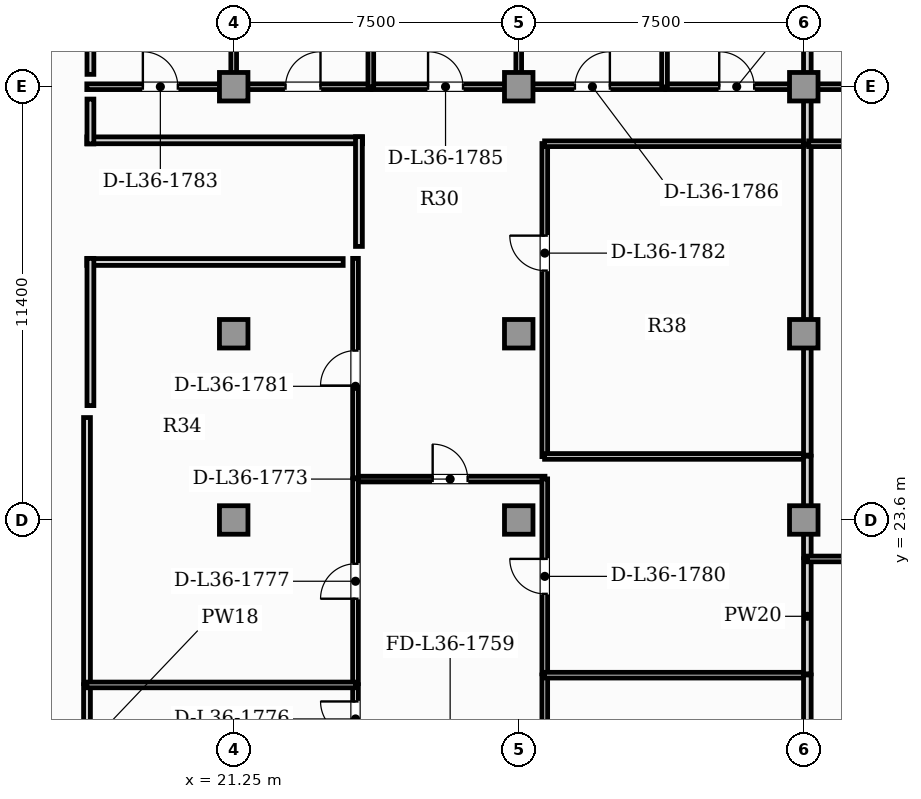
"""IFC4 building model, lengths in metres.
Left out: names, types, materials, properties, quantities, classifications, styles, units other than length and angle.
Written with IfcOpenShell. Run it as: python <this file> out.ifc"""

import sys

from ifc_helpers import new_model, si_unit, direction, frame, frame_2d, origin, origin_2d, place, context, subcontext, project, spatial, rectangle, extrude, element, fill, save


model = new_model("IFC4")
c1 = context("Model", 3, precision=1e-05, world=origin(), true_north=direction((0.0, 1.0)))
c2 = subcontext(c1, "Body", "Model", "MODEL_VIEW")
j1 = project(units=[si_unit("LENGTHUNIT", "METRE"), si_unit("PLANEANGLEUNIT", "RADIAN")], contexts=[c1])
p1 = place(None, origin())
s1 = spatial("IfcSite", under=j1, at=p1, CompositionType="ELEMENT")
p2 = place(p1, origin())
s2 = spatial("IfcBuilding", under=s1, at=p2, CompositionType="ELEMENT")
p3 = place(p2, frame((0.0, 0.0, 149.05)))
s3 = spatial("IfcBuildingStorey", under=s2, at=p3, CompositionType="ELEMENT", Elevation=149.05)
for number, where, z_axis, x_axis in (
    (1, (21.25, 23.6, 0.0), (0.0, 0.0, 1.0), (1.0, 0.0, 0.0)),
    (2, (28.75, 23.6, 0.0), (0.0, 0.0, 1.0), (1.0, 0.0, 0.0)),
    (3, (36.25, 23.6, 0.0), (0.0, 0.0, 1.0), (1.0, 0.0, 0.0)),
    (4, (21.25, 28.5, 0.0), (0.0, 0.0, 1.0), (1.0, 0.0, 0.0)),
    (5, (28.75, 28.5, 0.0), (0.0, 0.0, 1.0), (1.0, 0.0, 0.0)),
    (6, (36.25, 28.5, 0.0), (0.0, 0.0, 1.0), (1.0, 0.0, 0.0)),
    (7, (21.25, 35.0, 0.0), (0.0, 0.0, 1.0), (1.0, 0.0, 0.0)),
    (8, (28.75, 35.0, 0.0), (0.0, 0.0, 1.0), (1.0, 0.0, 0.0)),
    (9, (36.25, 35.0, 0.0), (0.0, 0.0, 1.0), (1.0, 0.0, 0.0)),
):
    element("IfcColumn", number, at=place(p3, frame(where, z_axis=z_axis, x_axis=x_axis)), inside=s3, PredefinedType="COLUMN", context=c2, shape_type="SweptSolid", body=[
        extrude(rectangle(XDim=0.75, YDim=0.75, at=origin_2d()), origin(), (0.0, 0.0, 1.0), 3.85),
    ])
p4 = place(p3, frame((17.39, 17.465, 0.0), z_axis=(0.0, 0.0, 1.0), x_axis=(0.0, 1.0, 0.0)))
e10 = element("IfcWall", 10, at=p4, inside=s3, PredefinedType="PARTITIONING", context=c2, shape_type="SweptSolid", body=[
    extrude(rectangle(XDim=1.8, YDim=0.18, at=frame_2d((0.9, 0.0))), origin(), (0.0, 0.0, 1.0), 3.63),
])
p5 = place(p3, frame((17.39, 19.295, 0.0), z_axis=(0.0, 0.0, 1.0), x_axis=(0.0, 1.0, 0.0)))
e11 = element("IfcWall", 11, at=p5, inside=s3, PredefinedType="PARTITIONING", context=c2, shape_type="SweptSolid", body=[
    extrude(rectangle(XDim=7.0, YDim=0.18, at=frame_2d((3.5, 0.0))), origin(), (0.0, 0.0, 1.0), 3.63),
])
p6 = place(p3, frame((24.45, 24.676, 0.0), z_axis=(0.0, 0.0, 1.0), x_axis=(1.0, 0.0, 0.0)))
e12 = element("IfcWall", 12, at=p6, inside=s3, PredefinedType="PARTITIONING", context=c2, shape_type="SweptSolid", body=[
    extrude(rectangle(XDim=4.99, YDim=0.15, at=frame_2d((2.495, 0.0))), origin(), (0.0, 0.0, 1.0), 3.63),
])
p7 = place(p6, frame((2.035, 0.0, 0.0)))
e13 = element("IfcOpeningElement", 13, at=p7, cuts=e12, PredefinedType="OPENING", context=c2, shape_type="SweptSolid", body=[
    extrude(rectangle(XDim=0.92, YDim=2.1, at=frame_2d((0.46, 1.05))), frame((0.0, 0.085, 0.0), z_axis=(0.0, -1.0, 0.0), x_axis=(1.0, 0.0, 0.0)), (0.0, 0.0, 1.0), 0.17),
])
p8 = place(p3, frame((24.455, 17.465, 0.0), z_axis=(0.0, 0.0, 1.0), x_axis=(0.0, 1.0, 0.0)))
e14 = element("IfcWall", 14, at=p8, inside=s3, PredefinedType="PARTITIONING", context=c2, shape_type="SweptSolid", body=[
    extrude(rectangle(XDim=1.8, YDim=0.15, at=frame_2d((0.9, 0.0))), origin(), (0.0, 0.0, 1.0), 3.63),
])
p9 = place(p8, frame((0.44, 0.0, 0.0)))
e15 = element("IfcOpeningElement", 15, at=p9, cuts=e14, PredefinedType="OPENING", context=c2, shape_type="SweptSolid", body=[
    extrude(rectangle(XDim=0.92, YDim=2.1, at=frame_2d((0.46, 1.05))), frame((0.0, 0.085, 0.0), z_axis=(0.0, -1.0, 0.0), x_axis=(1.0, 0.0, 0.0)), (0.0, 0.0, 1.0), 0.17),
])
p10 = place(p3, frame((24.455, 19.295, 0.0), z_axis=(0.0, 0.0, 1.0), x_axis=(0.0, 1.0, 0.0)))
e16 = element("IfcWall", 16, at=p10, inside=s3, PredefinedType="PARTITIONING", context=c2, shape_type="SweptSolid", body=[
    extrude(rectangle(XDim=5.386, YDim=0.15, at=frame_2d((2.693, 0.0))), origin(), (0.0, 0.0, 1.0), 3.63),
])
p11 = place(p10, frame((2.233, 0.0, 0.0)))
e17 = element("IfcOpeningElement", 17, at=p11, cuts=e16, PredefinedType="OPENING", context=c2, shape_type="SweptSolid", body=[
    extrude(rectangle(XDim=0.92, YDim=2.1, at=frame_2d((0.46, 1.05))), frame((0.0, 0.085, 0.0), z_axis=(0.0, -1.0, 0.0), x_axis=(1.0, 0.0, 0.0)), (0.0, 0.0, 1.0), 0.17),
])
p12 = place(p3, frame((29.435, 15.635, 0.0), z_axis=(0.0, 0.0, 1.0), x_axis=(0.0, 1.0, 0.0)))
e18 = element("IfcWall", 18, at=p12, inside=s3, PredefinedType="PARTITIONING", context=c2, shape_type="SweptSolid", body=[
    extrude(rectangle(XDim=3.886, YDim=0.15, at=frame_2d((1.943, 0.0))), origin(), (0.0, 0.0, 1.0), 3.63),
])
p13 = place(p12, frame((1.483, 0.0, 0.0)))
e19 = element("IfcOpeningElement", 19, at=p13, cuts=e18, PredefinedType="OPENING", context=c2, shape_type="SweptSolid", body=[
    extrude(rectangle(XDim=0.92, YDim=2.1, at=frame_2d((0.46, 1.05))), frame((0.0, 0.085, 0.0), z_axis=(0.0, -1.0, 0.0), x_axis=(1.0, 0.0, 0.0)), (0.0, 0.0, 1.0), 0.17),
])
p14 = place(p3, frame((29.435, 19.552, 0.0), z_axis=(0.0, 0.0, 1.0), x_axis=(0.0, 1.0, 0.0)))
e20 = element("IfcWall", 20, at=p14, inside=s3, PredefinedType="PARTITIONING", context=c2, shape_type="SweptSolid", body=[
    extrude(rectangle(XDim=5.13, YDim=0.15, at=frame_2d((2.565, 0.0))), origin(), (0.0, 0.0, 1.0), 3.63),
])
p15 = place(p14, frame((2.105, 0.0, 0.0)))
e21 = element("IfcOpeningElement", 21, at=p15, cuts=e20, PredefinedType="OPENING", context=c2, shape_type="SweptSolid", body=[
    extrude(rectangle(XDim=0.92, YDim=2.1, at=frame_2d((0.46, 1.05))), frame((0.0, 0.085, 0.0), z_axis=(0.0, -1.0, 0.0), x_axis=(1.0, 0.0, 0.0)), (0.0, 0.0, 1.0), 0.17),
])
p16 = place(p3, frame((24.455, 24.711, 0.0), z_axis=(0.0, 0.0, 1.0), x_axis=(0.0, 1.0, 0.0)))
e22 = element("IfcWall", 22, at=p16, inside=s3, PredefinedType="PARTITIONING", context=c2, shape_type="SweptSolid", body=[
    extrude(rectangle(XDim=5.772, YDim=0.15, at=frame_2d((2.886, 0.0))), origin(), (0.0, 0.0, 1.0), 3.63),
])
p17 = place(p16, frame((2.426, 0.0, 0.0)))
e23 = element("IfcOpeningElement", 23, at=p17, cuts=e22, PredefinedType="OPENING", context=c2, shape_type="SweptSolid", body=[
    extrude(rectangle(XDim=0.92, YDim=2.1, at=frame_2d((0.46, 1.05))), frame((0.0, 0.085, 0.0), z_axis=(0.0, -1.0, 0.0), x_axis=(1.0, 0.0, 0.0)), (0.0, 0.0, 1.0), 0.17),
])
p18 = place(p3, frame((29.435, 25.267, 0.0), z_axis=(0.0, 0.0, 1.0), x_axis=(0.0, 1.0, 0.0)))
e24 = element("IfcWall", 24, at=p18, inside=s3, PredefinedType="PARTITIONING", context=c2, shape_type="SweptSolid", body=[
    extrude(rectangle(XDim=8.238, YDim=0.15, at=frame_2d((4.119, 0.0))), origin(), (0.0, 0.0, 1.0), 3.63),
])
p19 = place(p18, frame((4.895, 0.0, 0.0)))
e25 = element("IfcOpeningElement", 25, at=p19, cuts=e24, PredefinedType="OPENING", context=c2, shape_type="SweptSolid", body=[
    extrude(rectangle(XDim=0.92, YDim=2.1, at=frame_2d((0.46, 1.05))), frame((0.0, 0.085, 0.0), z_axis=(0.0, -1.0, 0.0), x_axis=(1.0, 0.0, 0.0)), (0.0, 0.0, 1.0), 0.17),
])
p20 = place(p3, frame((29.43, 33.5, 0.0), z_axis=(0.0, 0.0, 1.0), x_axis=(1.0, 0.0, 0.0)))
e26 = element("IfcWall", 26, at=p20, inside=s3, PredefinedType="PARTITIONING", context=c2, shape_type="SweptSolid", body=[
    extrude(rectangle(XDim=6.919, YDim=0.15, at=frame_2d((3.459, 0.0))), origin(), (0.0, 0.0, 1.0), 3.63),
])
p21 = place(p3, frame((17.385, 35.0, 0.0), z_axis=(0.0, 0.0, 1.0), x_axis=(1.0, 0.0, 0.0)))
e27 = element("IfcWall", 27, at=p21, inside=s3, PredefinedType="PARTITIONING", context=c2, shape_type="SweptSolid", body=[
    extrude(rectangle(XDim=3.87, YDim=0.15, at=frame_2d((1.935, 0.0))), origin(), (0.0, 0.0, 1.0), 3.013),
])
p22 = place(p21, frame((1.475, 0.0, 0.0)))
e28 = element("IfcOpeningElement", 28, at=p22, cuts=e27, PredefinedType="OPENING", context=c2, shape_type="SweptSolid", body=[
    extrude(rectangle(XDim=0.92, YDim=2.1, at=frame_2d((0.46, 1.05))), frame((0.0, 0.085, 0.0), z_axis=(0.0, -1.0, 0.0), x_axis=(1.0, 0.0, 0.0)), (0.0, 0.0, 1.0), 0.17),
])
p23 = place(p3, frame((21.285, 35.0, 0.0), z_axis=(0.0, 0.0, 1.0), x_axis=(1.0, 0.0, 0.0)))
e29 = element("IfcWall", 29, at=p23, inside=s3, PredefinedType="PARTITIONING", context=c2, shape_type="SweptSolid", body=[
    extrude(rectangle(XDim=3.578, YDim=0.15, at=frame_2d((1.789, 0.0))), origin(), (0.0, 0.0, 1.0), 3.013),
])
p24 = place(p23, frame((1.329, 0.0, 0.0)))
e30 = element("IfcOpeningElement", 30, at=p24, cuts=e29, PredefinedType="OPENING", context=c2, shape_type="SweptSolid", body=[
    extrude(rectangle(XDim=0.92, YDim=2.1, at=frame_2d((0.46, 1.05))), frame((0.0, 0.085, 0.0), z_axis=(0.0, -1.0, 0.0), x_axis=(1.0, 0.0, 0.0)), (0.0, 0.0, 1.0), 0.17),
])
p25 = place(p3, frame((24.893, 35.0, 0.0), z_axis=(0.0, 0.0, 1.0), x_axis=(1.0, 0.0, 0.0)))
e31 = element("IfcWall", 31, at=p25, inside=s3, PredefinedType="PARTITIONING", context=c2, shape_type="SweptSolid", body=[
    extrude(rectangle(XDim=3.862, YDim=0.15, at=frame_2d((1.931, 0.0))), origin(), (0.0, 0.0, 1.0), 3.013),
])
p26 = place(p25, frame((1.471, 0.0, 0.0)))
e32 = element("IfcOpeningElement", 32, at=p26, cuts=e31, PredefinedType="OPENING", context=c2, shape_type="SweptSolid", body=[
    extrude(rectangle(XDim=0.92, YDim=2.1, at=frame_2d((0.46, 1.05))), frame((0.0, 0.085, 0.0), z_axis=(0.0, -1.0, 0.0), x_axis=(1.0, 0.0, 0.0)), (0.0, 0.0, 1.0), 0.17),
])
p27 = place(p3, frame((28.785, 35.0, 0.0), z_axis=(0.0, 0.0, 1.0), x_axis=(1.0, 0.0, 0.0)))
e33 = element("IfcWall", 33, at=p27, inside=s3, PredefinedType="PARTITIONING", context=c2, shape_type="SweptSolid", body=[
    extrude(rectangle(XDim=3.807, YDim=0.15, at=frame_2d((1.903, 0.0))), origin(), (0.0, 0.0, 1.0), 3.013),
])
p28 = place(p27, frame((1.443, 0.0, 0.0)))
e34 = element("IfcOpeningElement", 34, at=p28, cuts=e33, PredefinedType="OPENING", context=c2, shape_type="SweptSolid", body=[
    extrude(rectangle(XDim=0.92, YDim=2.1, at=frame_2d((0.46, 1.05))), frame((0.0, 0.085, 0.0), z_axis=(0.0, -1.0, 0.0), x_axis=(1.0, 0.0, 0.0)), (0.0, 0.0, 1.0), 0.17),
])
p29 = place(p3, frame((32.622, 35.0, 0.0), z_axis=(0.0, 0.0, 1.0), x_axis=(1.0, 0.0, 0.0)))
e35 = element("IfcWall", 35, at=p29, inside=s3, PredefinedType="PARTITIONING", context=c2, shape_type="SweptSolid", body=[
    extrude(rectangle(XDim=3.728, YDim=0.15, at=frame_2d((1.864, 0.0))), origin(), (0.0, 0.0, 1.0), 3.013),
])
p30 = place(p29, frame((1.404, 0.0, 0.0)))
e36 = element("IfcOpeningElement", 36, at=p30, cuts=e35, PredefinedType="OPENING", context=c2, shape_type="SweptSolid", body=[
    extrude(rectangle(XDim=0.92, YDim=2.1, at=frame_2d((0.46, 1.05))), frame((0.0, 0.085, 0.0), z_axis=(0.0, -1.0, 0.0), x_axis=(1.0, 0.0, 0.0)), (0.0, 0.0, 1.0), 0.17),
])
p31 = place(p3, frame((36.344, 33.495, 0.0), z_axis=(0.0, 0.0, 1.0), x_axis=(0.0, 1.0, 0.0)))
e37 = element("IfcWall", 37, at=p31, inside=s3, PredefinedType="PARTITIONING", context=c2, shape_type="SweptSolid", body=[
    extrude(rectangle(XDim=1.51, YDim=0.2, at=frame_2d((0.755, 0.0))), origin(), (0.0, 0.0, 1.0), 3.177),
])
p32 = place(p3, frame((17.385, 19.26, 0.0), z_axis=(0.0, 0.0, 1.0), x_axis=(1.0, 0.0, 0.0)))
e38 = element("IfcWall", 38, at=p32, inside=s3, PredefinedType="PARTITIONING", context=c2, shape_type="SweptSolid", body=[
    extrude(rectangle(XDim=7.075, YDim=0.15, at=frame_2d((3.538, 0.0))), origin(), (0.0, 0.0, 1.0), 3.63),
])
p33 = place(p3, frame((29.43, 19.517, 0.0), z_axis=(0.0, 0.0, 1.0), x_axis=(1.0, 0.0, 0.0)))
e39 = element("IfcWall", 39, at=p33, inside=s3, PredefinedType="PARTITIONING", context=c2, shape_type="SweptSolid", body=[
    extrude(rectangle(XDim=6.919, YDim=0.15, at=frame_2d((3.459, 0.0))), origin(), (0.0, 0.0, 1.0), 3.63),
])
p34 = place(p3, frame((36.344, 15.635, 0.0), z_axis=(0.0, 0.0, 1.0), x_axis=(0.0, 1.0, 0.0)))
e40 = element("IfcWall", 40, at=p34, inside=s3, PredefinedType="PARTITIONING", context=c2, shape_type="SweptSolid", body=[
    extrude(rectangle(XDim=3.886, YDim=0.2, at=frame_2d((1.943, 0.0))), origin(), (0.0, 0.0, 1.0), 3.177),
])
p35 = place(p3, frame((29.43, 25.272, 0.0), z_axis=(0.0, 0.0, 1.0), x_axis=(1.0, 0.0, 0.0)))
e41 = element("IfcWall", 41, at=p35, inside=s3, PredefinedType="PARTITIONING", context=c2, shape_type="SweptSolid", body=[
    extrude(rectangle(XDim=6.919, YDim=0.15, at=frame_2d((3.459, 0.0))), origin(), (0.0, 0.0, 1.0), 3.63),
])
p36 = place(p3, frame((36.344, 19.552, 0.0), z_axis=(0.0, 0.0, 1.0), x_axis=(0.0, 1.0, 0.0)))
e42 = element("IfcWall", 42, at=p36, inside=s3, PredefinedType="PARTITIONING", context=c2, shape_type="SweptSolid", body=[
    extrude(rectangle(XDim=3.028, YDim=0.2, at=frame_2d((1.514, 0.0))), origin(), (0.0, 0.0, 1.0), 3.177),
])
p37 = place(p3, frame((36.344, 22.61, 0.0), z_axis=(0.0, 0.0, 1.0), x_axis=(0.0, 1.0, 0.0)))
e43 = element("IfcWall", 43, at=p37, inside=s3, PredefinedType="PARTITIONING", context=c2, shape_type="SweptSolid", body=[
    extrude(rectangle(XDim=2.667, YDim=0.2, at=frame_2d((1.334, 0.0))), origin(), (0.0, 0.0, 1.0), 3.177),
])
p38 = place(p3, frame((36.344, 25.307, 0.0), z_axis=(0.0, 0.0, 1.0), x_axis=(0.0, 1.0, 0.0)))
e44 = element("IfcWall", 44, at=p38, inside=s3, PredefinedType="PARTITIONING", context=c2, shape_type="SweptSolid", body=[
    extrude(rectangle(XDim=8.158, YDim=0.2, at=frame_2d((4.079, 0.0))), origin(), (0.0, 0.0, 1.0), 3.177),
])
for number, where, z_axis, x_axis in (
    (45, (21.25, 34.995, 0.0), (0.0, 0.0, 1.0), (0.0, 1.0, 0.0)),
    (46, (24.858, 34.995, 0.0), (0.0, 0.0, 1.0), (0.0, 1.0, 0.0)),
    (47, (28.75, 34.995, 0.0), (0.0, 0.0, 1.0), (0.0, 1.0, 0.0)),
    (48, (32.586, 34.995, 0.0), (0.0, 0.0, 1.0), (0.0, 1.0, 0.0)),
):
    element("IfcWall", number, at=place(p3, frame(where, z_axis=z_axis, x_axis=x_axis)), inside=s3, PredefinedType="PARTITIONING", context=c2, shape_type="SweptSolid", body=[
        extrude(rectangle(XDim=8.032, YDim=0.15, at=frame_2d((4.016, 0.0))), origin(), (0.0, 0.0, 1.0), 3.63),
    ])
p39 = place(p3, frame((36.344, 35.035, 0.0), z_axis=(0.0, 0.0, 1.0), x_axis=(0.0, 1.0, 0.0)))
e49 = element("IfcWall", 49, at=p39, inside=s3, PredefinedType="PARTITIONING", context=c2, shape_type="SweptSolid", body=[
    extrude(rectangle(XDim=7.993, YDim=0.2, at=frame_2d((3.996, 0.0))), origin(), (0.0, 0.0, 1.0), 3.63),
])
p40 = place(p3, frame((36.379, 33.5, 0.0), z_axis=(0.0, 0.0, 1.0), x_axis=(1.0, 0.0, 0.0)))
e50 = element("IfcWall", 50, at=p40, inside=s3, PredefinedType="PARTITIONING", context=c2, shape_type="SweptSolid", body=[
    extrude(rectangle(XDim=6.343, YDim=0.15, at=frame_2d((3.171, 0.0))), origin(), (0.0, 0.0, 1.0), 3.63),
])
p41 = place(p3, frame((36.379, 35.0, 0.0), z_axis=(0.0, 0.0, 1.0), x_axis=(1.0, 0.0, 0.0)))
e51 = element("IfcWall", 51, at=p41, inside=s3, PredefinedType="PARTITIONING", context=c2, shape_type="SweptSolid", body=[
    extrude(rectangle(XDim=5.198, YDim=0.15, at=frame_2d((2.599, 0.0))), origin(), (0.0, 0.0, 1.0), 3.013),
])
p42 = place(p41, frame((2.139, 0.0, 0.0)))
e52 = element("IfcOpeningElement", 52, at=p42, cuts=e51, PredefinedType="OPENING", context=c2, shape_type="SweptSolid", body=[
    extrude(rectangle(XDim=0.92, YDim=2.1, at=frame_2d((0.46, 1.05))), frame((0.0, 0.085, 0.0), z_axis=(0.0, -1.0, 0.0), x_axis=(1.0, 0.0, 0.0)), (0.0, 0.0, 1.0), 0.17),
])
p43 = place(p3, frame((36.339, 22.575, 0.0), z_axis=(0.0, 0.0, 1.0), x_axis=(1.0, 0.0, 0.0)))
e53 = element("IfcWall", 53, at=p43, inside=s3, PredefinedType="PARTITIONING", context=c2, shape_type="SweptSolid", body=[
    extrude(rectangle(XDim=6.383, YDim=0.15, at=frame_2d((3.191, 0.0))), origin(), (0.0, 0.0, 1.0), 3.63),
])
p44 = place(p3, frame((24.64, 33.59, 0.0), z_axis=(0.0, 0.0, 1.0), x_axis=(-1.0, 0.0, 0.0)))
e54 = element("IfcWall", 54, at=p44, inside=s3, PredefinedType="PARTITIONING", context=c2, shape_type="SweptSolid", body=[
    extrude(rectangle(XDim=7.255, YDim=0.18, at=frame_2d((3.627, 0.0))), origin(), (0.0, 0.0, 1.0), 3.63),
])
p45 = place(p3, frame((17.48, 33.495, 0.0), z_axis=(0.0, 0.0, 1.0), x_axis=(0.0, 1.0, 0.0)))
e55 = element("IfcWall", 55, at=p45, inside=s3, PredefinedType="PARTITIONING", context=c2, shape_type="SweptSolid", body=[
    extrude(rectangle(XDim=1.18, YDim=0.18, at=frame_2d((0.59, 0.0))), origin(), (0.0, 0.0, 1.0), 3.63),
])
p46 = place(p3, frame((24.545, 30.798, 0.0), z_axis=(0.0, 0.0, 1.0), x_axis=(0.0, 1.0, 0.0)))
e56 = element("IfcWall", 56, at=p46, inside=s3, PredefinedType="PARTITIONING", context=c2, shape_type="SweptSolid", body=[
    extrude(rectangle(XDim=2.887, YDim=0.18, at=frame_2d((1.443, 0.0))), origin(), (0.0, 0.0, 1.0), 3.63),
])
p47 = place(p3, frame((17.385, 30.388, 0.0), z_axis=(0.0, 0.0, 1.0), x_axis=(1.0, 0.0, 0.0)))
e57 = element("IfcWall", 57, at=p47, inside=s3, PredefinedType="PARTITIONING", context=c2, shape_type="SweptSolid", body=[
    extrude(rectangle(XDim=6.745, YDim=0.18, at=frame_2d((3.373, 0.0))), origin(), (0.0, 0.0, 1.0), 3.63),
])
p48 = place(p3, frame((17.48, 26.61, 0.0), z_axis=(0.0, 0.0, 1.0), x_axis=(0.0, 1.0, 0.0)))
e58 = element("IfcWall", 58, at=p48, inside=s3, PredefinedType="PARTITIONING", context=c2, shape_type="SweptSolid", body=[
    extrude(rectangle(XDim=3.873, YDim=0.18, at=frame_2d((1.937, 0.0))), origin(), (0.0, 0.0, 1.0), 3.63),
])
p49 = place(p3, frame((17.48, 35.325, 0.0), z_axis=(0.0, 0.0, 1.0), x_axis=(0.0, 1.0, 0.0)))
e59 = element("IfcWall", 59, at=p49, inside=s3, PredefinedType="PARTITIONING", context=c2, shape_type="SweptSolid", body=[
    extrude(rectangle(XDim=7.703, YDim=0.18, at=frame_2d((3.851, 0.0))), origin(), (0.0, 0.0, 1.0), 3.63),
])
p50 = place(p7, origin())
e60 = element("IfcDoor", 60, at=p50, inside=s3, OperationType="SINGLE_SWING_LEFT", PredefinedType="DOOR", context=c2, shape_type="SweptSolid", body=[
    extrude(rectangle(XDim=0.92, YDim=2.1, at=frame_2d((0.46, 1.05))), frame((0.0, 0.025, 0.0), z_axis=(0.0, -1.0, 0.0), x_axis=(1.0, 0.0, 0.0)), (0.0, 0.0, 1.0), 0.05),
])
fill(e13, e60)
p51 = place(p9, origin())
e61 = element("IfcDoor", 61, at=p51, inside=s3, OperationType="SINGLE_SWING_RIGHT", PredefinedType="DOOR", context=c2, shape_type="SweptSolid", body=[
    extrude(rectangle(XDim=0.92, YDim=2.1, at=frame_2d((0.46, 1.05))), frame((0.0, 0.025, 0.0), z_axis=(0.0, -1.0, 0.0), x_axis=(1.0, 0.0, 0.0)), (0.0, 0.0, 1.0), 0.05),
])
fill(e15, e61)
p52 = place(p11, origin())
e62 = element("IfcDoor", 62, at=p52, inside=s3, OperationType="SINGLE_SWING_LEFT", PredefinedType="DOOR", context=c2, shape_type="SweptSolid", body=[
    extrude(rectangle(XDim=0.92, YDim=2.1, at=frame_2d((0.46, 1.05))), frame((0.0, 0.025, 0.0), z_axis=(0.0, -1.0, 0.0), x_axis=(1.0, 0.0, 0.0)), (0.0, 0.0, 1.0), 0.05),
])
fill(e17, e62)
p53 = place(p15, origin())
e63 = element("IfcDoor", 63, at=p53, inside=s3, OperationType="SINGLE_SWING_RIGHT", PredefinedType="DOOR", context=c2, shape_type="SweptSolid", body=[
    extrude(rectangle(XDim=0.92, YDim=2.1, at=frame_2d((0.46, 1.05))), frame((0.0, 0.025, 0.0), z_axis=(0.0, -1.0, 0.0), x_axis=(1.0, 0.0, 0.0)), (0.0, 0.0, 1.0), 0.05),
])
fill(e21, e63)
p54 = place(p17, origin())
e64 = element("IfcDoor", 64, at=p54, inside=s3, OperationType="SINGLE_SWING_LEFT", PredefinedType="DOOR", context=c2, shape_type="SweptSolid", body=[
    extrude(rectangle(XDim=0.92, YDim=2.1, at=frame_2d((0.46, 1.05))), frame((0.0, 0.025, 0.0), z_axis=(0.0, -1.0, 0.0), x_axis=(1.0, 0.0, 0.0)), (0.0, 0.0, 1.0), 0.05),
])
fill(e23, e64)
p55 = place(p19, origin())
e65 = element("IfcDoor", 65, at=p55, inside=s3, OperationType="SINGLE_SWING_RIGHT", PredefinedType="DOOR", context=c2, shape_type="SweptSolid", body=[
    extrude(rectangle(XDim=0.92, YDim=2.1, at=frame_2d((0.46, 1.05))), frame((0.0, 0.025, 0.0), z_axis=(0.0, -1.0, 0.0), x_axis=(1.0, 0.0, 0.0)), (0.0, 0.0, 1.0), 0.05),
])
fill(e25, e65)
p56 = place(p22, origin())
e66 = element("IfcDoor", 66, at=p56, inside=s3, OperationType="SINGLE_SWING_LEFT", PredefinedType="DOOR", context=c2, shape_type="SweptSolid", body=[
    extrude(rectangle(XDim=0.92, YDim=2.1, at=frame_2d((0.46, 1.05))), frame((0.0, 0.025, 0.0), z_axis=(0.0, -1.0, 0.0), x_axis=(1.0, 0.0, 0.0)), (0.0, 0.0, 1.0), 0.05),
])
fill(e28, e66)
p57 = place(p24, origin())
e67 = element("IfcDoor", 67, at=p57, inside=s3, OperationType="SINGLE_SWING_RIGHT", PredefinedType="DOOR", context=c2, shape_type="SweptSolid", body=[
    extrude(rectangle(XDim=0.92, YDim=2.1, at=frame_2d((0.46, 1.05))), frame((0.0, 0.025, 0.0), z_axis=(0.0, -1.0, 0.0), x_axis=(1.0, 0.0, 0.0)), (0.0, 0.0, 1.0), 0.05),
])
fill(e30, e67)
p58 = place(p26, origin())
e68 = element("IfcDoor", 68, at=p58, inside=s3, OperationType="SINGLE_SWING_LEFT", PredefinedType="DOOR", context=c2, shape_type="SweptSolid", body=[
    extrude(rectangle(XDim=0.92, YDim=2.1, at=frame_2d((0.46, 1.05))), frame((0.0, 0.025, 0.0), z_axis=(0.0, -1.0, 0.0), x_axis=(1.0, 0.0, 0.0)), (0.0, 0.0, 1.0), 0.05),
])
fill(e32, e68)
p59 = place(p28, origin())
e69 = element("IfcDoor", 69, at=p59, inside=s3, OperationType="SINGLE_SWING_RIGHT", PredefinedType="DOOR", context=c2, shape_type="SweptSolid", body=[
    extrude(rectangle(XDim=0.92, YDim=2.1, at=frame_2d((0.46, 1.05))), frame((0.0, 0.025, 0.0), z_axis=(0.0, -1.0, 0.0), x_axis=(1.0, 0.0, 0.0)), (0.0, 0.0, 1.0), 0.05),
])
fill(e34, e69)
p60 = place(p30, origin())
e70 = element("IfcDoor", 70, at=p60, inside=s3, OperationType="SINGLE_SWING_LEFT", PredefinedType="DOOR", context=c2, shape_type="SweptSolid", body=[
    extrude(rectangle(XDim=0.92, YDim=2.1, at=frame_2d((0.46, 1.05))), frame((0.0, 0.025, 0.0), z_axis=(0.0, -1.0, 0.0), x_axis=(1.0, 0.0, 0.0)), (0.0, 0.0, 1.0), 0.05),
])
fill(e36, e70)
save(model, sys.argv[1])
